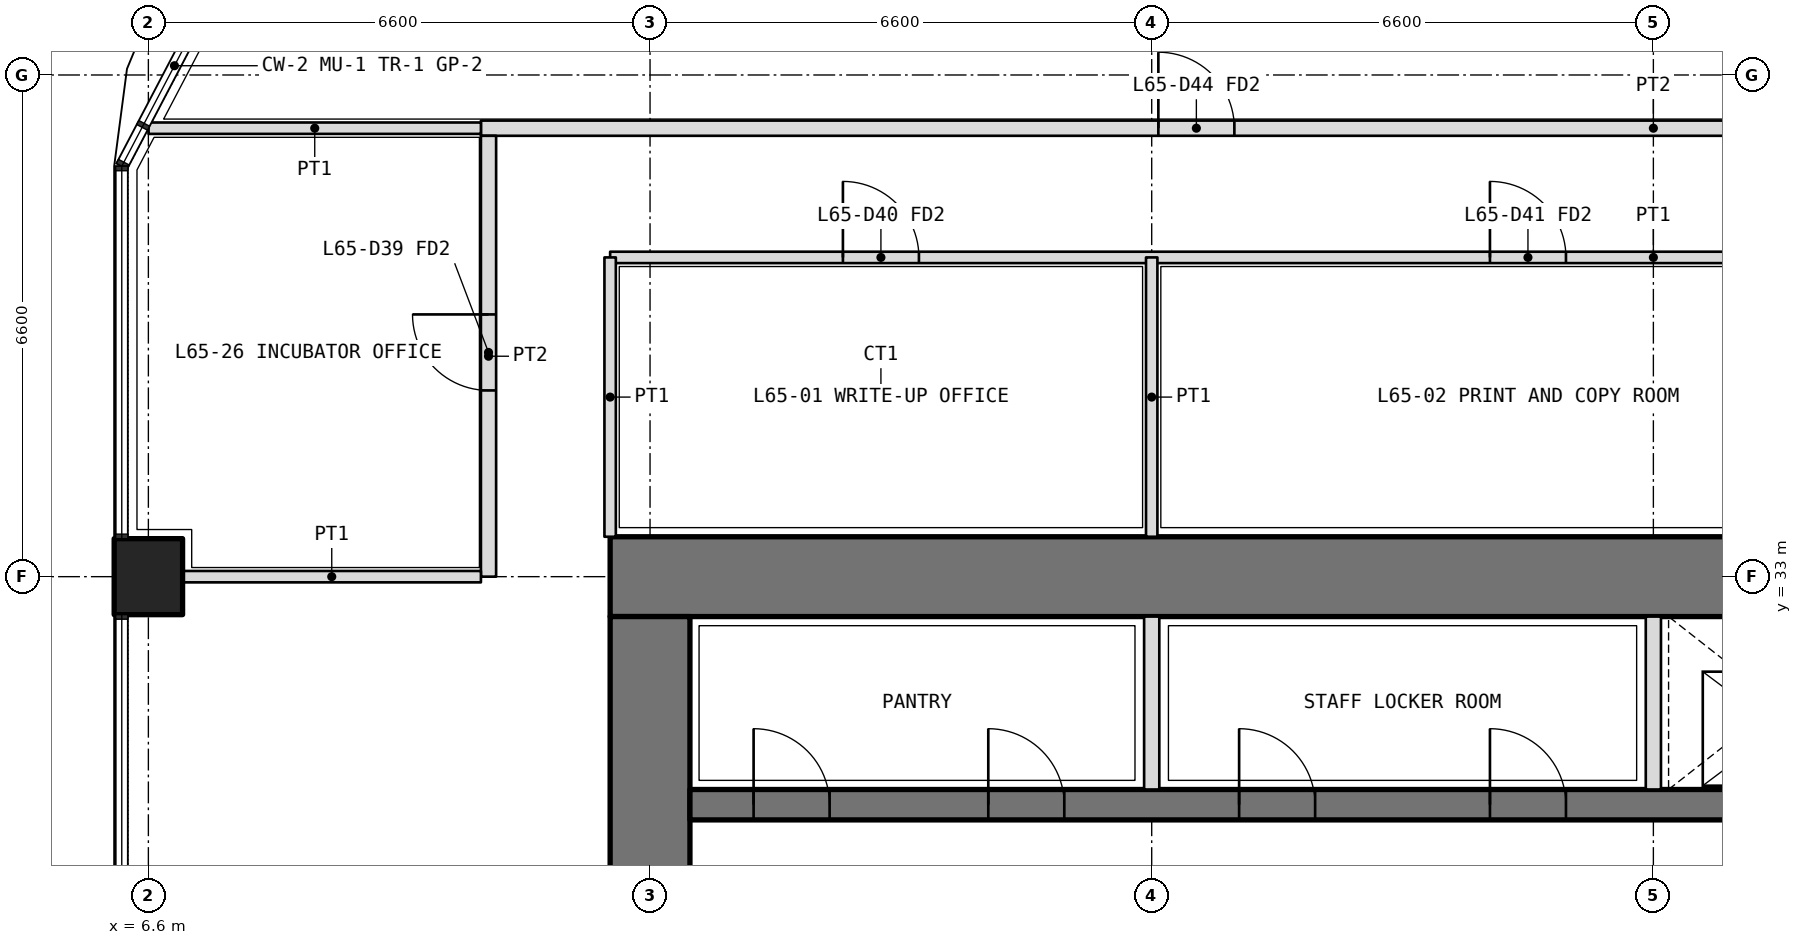
"""IFC4 building model, lengths in metres.
Left out: names, types, materials, properties, quantities, classifications, styles, units other than length and angle.
Written with IfcOpenShell. Run it as: python <this file> out.ifc"""

import sys

from ifc_helpers import new_model, si_unit, direction, frame, frame_2d, origin, origin_2d, place, context, subcontext, project, spatial, rectangle, extrude, element, fill, save


model = new_model("IFC4")
c1 = context("Model", 3, precision=1e-05, world=origin(), true_north=direction((0.0, 1.0)))
c2 = subcontext(c1, "Body", "Model", "MODEL_VIEW")
j1 = project(units=[si_unit("LENGTHUNIT", "METRE"), si_unit("PLANEANGLEUNIT", "RADIAN")], contexts=[c1])
p1 = place(None, origin())
s1 = spatial("IfcSite", under=j1, at=p1, CompositionType="ELEMENT")
p2 = place(p1, origin())
s2 = spatial("IfcBuilding", under=s1, at=p2, CompositionType="ELEMENT")
p3 = place(p2, frame((0.0, 0.0, 283.8)))
s3 = spatial("IfcBuildingStorey", under=s2, at=p3, CompositionType="ELEMENT", Elevation=283.8)
p4 = place(p3, frame((6.6, 33.0, 0.0), z_axis=(0.0, 0.0, 1.0), x_axis=(0.0, 1.0, 0.0)))
e1 = element("IfcColumn", 1, at=p4, inside=s3, PredefinedType="COLUMN", context=c2, shape_type="SweptSolid", body=[
    extrude(rectangle(XDim=1.0, YDim=0.9, at=origin_2d()), origin(), (0.0, 0.0, 1.0), 4.2),
])
p5 = place(p3, frame((40.125, 33.0, 0.0), z_axis=(0.0, 0.0, 1.0), x_axis=(-1.0, 0.0, 0.0)))
e2 = element("IfcWall", 2, at=p5, inside=s3, PredefinedType="SHEAR", context=c2, shape_type="SweptSolid", body=[
    extrude(rectangle(XDim=27.45, YDim=1.05, at=frame_2d((13.725, 0.0))), origin(), (0.0, 0.0, 1.0), 4.2),
])
p6 = place(p3, frame((13.2, 32.475, 0.0), z_axis=(0.0, 0.0, 1.0), x_axis=(0.0, -1.0, 0.0)))
e3 = element("IfcWall", 3, at=p6, inside=s3, PredefinedType="SHEAR", context=c2, shape_type="SweptSolid", body=[
    extrude(rectangle(XDim=18.75, YDim=1.05, at=frame_2d((9.375, 0.0))), origin(), (0.0, 0.0, 1.0), 4.2),
])
p7 = place(p6, frame((14.125, 0.0, 0.0)))
e4 = element("IfcOpeningElement", 4, at=p7, cuts=e3, PredefinedType="OPENING", context=c2, shape_type="SweptSolid", body=[
    extrude(rectangle(XDim=1.6, YDim=2.1, at=frame_2d((0.8, 1.05))), frame((0.0, 0.535, 0.0), z_axis=(0.0, -1.0, 0.0), x_axis=(1.0, 0.0, 0.0)), (0.0, 0.0, 1.0), 1.07),
])
p8 = place(p6, frame((3.325, 0.0, 0.0)))
e5 = element("IfcOpeningElement", 5, at=p8, cuts=e3, PredefinedType="OPENING", context=c2, shape_type="SweptSolid", body=[
    extrude(rectangle(XDim=1.6, YDim=2.1, at=frame_2d((0.8, 1.05))), frame((0.0, 0.535, 0.0), z_axis=(0.0, -1.0, 0.0), x_axis=(1.0, 0.0, 0.0)), (0.0, 0.0, 1.0), 1.07),
])
p9 = place(p3, frame((13.725, 30.0, 0.0), z_axis=(0.0, 0.0, 1.0), x_axis=(1.0, 0.0, 0.0)))
e6 = element("IfcWall", 6, at=p9, inside=s3, PredefinedType="SHEAR", context=c2, shape_type="SweptSolid", body=[
    extrude(rectangle(XDim=25.35, YDim=0.4, at=frame_2d((12.675, 0.0))), origin(), (0.0, 0.0, 1.0), 4.2),
])
p10 = place(p9, frame((0.837, 0.0, 0.0)))
e7 = element("IfcOpeningElement", 7, at=p10, cuts=e6, PredefinedType="OPENING", context=c2, shape_type="SweptSolid", body=[
    extrude(rectangle(XDim=1.0, YDim=2.1, at=frame_2d((0.5, 1.05))), frame((0.0, 0.21, 0.0), z_axis=(0.0, -1.0, 0.0), x_axis=(1.0, 0.0, 0.0)), (0.0, 0.0, 1.0), 0.42),
])
p11 = place(p9, frame((3.925, 0.0, 0.0)))
e8 = element("IfcOpeningElement", 8, at=p11, cuts=e6, PredefinedType="OPENING", context=c2, shape_type="SweptSolid", body=[
    extrude(rectangle(XDim=1.0, YDim=2.1, at=frame_2d((0.5, 1.05))), frame((0.0, 0.21, 0.0), z_axis=(0.0, -1.0, 0.0), x_axis=(1.0, 0.0, 0.0)), (0.0, 0.0, 1.0), 0.42),
])
p12 = place(p9, frame((7.225, 0.0, 0.0)))
e9 = element("IfcOpeningElement", 9, at=p12, cuts=e6, PredefinedType="OPENING", context=c2, shape_type="SweptSolid", body=[
    extrude(rectangle(XDim=1.0, YDim=2.1, at=frame_2d((0.5, 1.05))), frame((0.0, 0.21, 0.0), z_axis=(0.0, -1.0, 0.0), x_axis=(1.0, 0.0, 0.0)), (0.0, 0.0, 1.0), 0.42),
])
p13 = place(p9, frame((10.525, 0.0, 0.0)))
e10 = element("IfcOpeningElement", 10, at=p13, cuts=e6, PredefinedType="OPENING", context=c2, shape_type="SweptSolid", body=[
    extrude(rectangle(XDim=1.0, YDim=2.1, at=frame_2d((0.5, 1.05))), frame((0.0, 0.21, 0.0), z_axis=(0.0, -1.0, 0.0), x_axis=(1.0, 0.0, 0.0)), (0.0, 0.0, 1.0), 0.42),
])
p14 = place(p9, frame((13.775, 0.0, 0.0)))
e11 = element("IfcOpeningElement", 11, at=p14, cuts=e6, PredefinedType="OPENING", context=c2, shape_type="SweptSolid", body=[
    extrude(rectangle(XDim=1.1, YDim=2.1, at=frame_2d((0.55, 1.05))), frame((0.0, 0.21, 0.0), z_axis=(0.0, -1.0, 0.0), x_axis=(1.0, 0.0, 0.0)), (0.0, 0.0, 1.0), 0.42),
])
p15 = place(p9, frame((17.075, 0.0, 0.0)))
e12 = element("IfcOpeningElement", 12, at=p15, cuts=e6, PredefinedType="OPENING", context=c2, shape_type="SweptSolid", body=[
    extrude(rectangle(XDim=1.1, YDim=2.1, at=frame_2d((0.55, 1.05))), frame((0.0, 0.21, 0.0), z_axis=(0.0, -1.0, 0.0), x_axis=(1.0, 0.0, 0.0)), (0.0, 0.0, 1.0), 0.42),
])
p16 = place(p9, frame((20.375, 0.0, 0.0)))
e13 = element("IfcOpeningElement", 13, at=p16, cuts=e6, PredefinedType="OPENING", context=c2, shape_type="SweptSolid", body=[
    extrude(rectangle(XDim=1.1, YDim=2.1, at=frame_2d((0.55, 1.05))), frame((0.0, 0.21, 0.0), z_axis=(0.0, -1.0, 0.0), x_axis=(1.0, 0.0, 0.0)), (0.0, 0.0, 1.0), 0.42),
])
p17 = place(p9, frame((23.462, 0.0, 0.0)))
e14 = element("IfcOpeningElement", 14, at=p17, cuts=e6, PredefinedType="OPENING", context=c2, shape_type="SweptSolid", body=[
    extrude(rectangle(XDim=1.1, YDim=2.1, at=frame_2d((0.55, 1.05))), frame((0.0, 0.21, 0.0), z_axis=(0.0, -1.0, 0.0), x_axis=(1.0, 0.0, 0.0)), (0.0, 0.0, 1.0), 0.42),
])
for number, where, z_axis, x_axis in (
    (15, (19.8, 30.2, 0.0), (0.0, 0.0, 1.0), (0.0, 1.0, 0.0)),
    (16, (26.4, 30.2, 0.0), (0.0, 0.0, 1.0), (0.0, 1.0, 0.0)),
):
    element("IfcWall", number, at=place(p3, frame(where, z_axis=z_axis, x_axis=x_axis)), inside=s3, PredefinedType="PARTITIONING", context=c2, shape_type="SweptSolid", body=[
        extrude(rectangle(XDim=2.275, YDim=0.2, at=frame_2d((1.138, 0.0))), origin(), (0.0, 0.0, 1.0), 4.2),
    ])
p18 = place(p3, frame((12.675, 37.2, 0.0), z_axis=(0.0, 0.0, 1.0), x_axis=(1.0, 0.0, 0.0)))
e17 = element("IfcWall", 17, at=p18, inside=s3, PredefinedType="PARTITIONING", context=c2, shape_type="SweptSolid", body=[
    extrude(rectangle(XDim=27.45, YDim=0.15, at=frame_2d((13.725, 0.0))), origin(), (0.0, 0.0, 1.0), 3.0),
])
p19 = place(p18, frame((3.062, 0.0, 0.0)))
e18 = element("IfcOpeningElement", 18, at=p19, cuts=e17, PredefinedType="OPENING", context=c2, shape_type="SweptSolid", body=[
    extrude(rectangle(XDim=1.0, YDim=2.1, at=frame_2d((0.5, 1.05))), frame((0.0, 0.085, 0.0), z_axis=(0.0, -1.0, 0.0), x_axis=(1.0, 0.0, 0.0)), (0.0, 0.0, 1.0), 0.17),
])
p20 = place(p18, frame((11.575, 0.0, 0.0)))
e19 = element("IfcOpeningElement", 19, at=p20, cuts=e17, PredefinedType="OPENING", context=c2, shape_type="SweptSolid", body=[
    extrude(rectangle(XDim=1.0, YDim=2.1, at=frame_2d((0.5, 1.05))), frame((0.0, 0.085, 0.0), z_axis=(0.0, -1.0, 0.0), x_axis=(1.0, 0.0, 0.0)), (0.0, 0.0, 1.0), 0.17),
])
p21 = place(p18, frame((19.825, 0.0, 0.0)))
e20 = element("IfcOpeningElement", 20, at=p21, cuts=e17, PredefinedType="OPENING", context=c2, shape_type="SweptSolid", body=[
    extrude(rectangle(XDim=1.0, YDim=2.1, at=frame_2d((0.5, 1.05))), frame((0.0, 0.085, 0.0), z_axis=(0.0, -1.0, 0.0), x_axis=(1.0, 0.0, 0.0)), (0.0, 0.0, 1.0), 0.17),
])
p22 = place(p18, frame((25.038, 0.0, 0.0)))
e21 = element("IfcOpeningElement", 21, at=p22, cuts=e17, PredefinedType="OPENING", context=c2, shape_type="SweptSolid", body=[
    extrude(rectangle(XDim=1.0, YDim=2.1, at=frame_2d((0.5, 1.05))), frame((0.0, 0.085, 0.0), z_axis=(0.0, -1.0, 0.0), x_axis=(1.0, 0.0, 0.0)), (0.0, 0.0, 1.0), 0.17),
])
for number, where, z_axis, x_axis in (
    (22, (12.675, 33.525, 0.0), (0.0, 0.0, 1.0), (0.0, 1.0, 0.0)),
    (23, (19.8, 33.525, 0.0), (0.0, 0.0, 1.0), (0.0, 1.0, 0.0)),
):
    element("IfcWall", number, at=place(p3, frame(where, z_axis=z_axis, x_axis=x_axis)), inside=s3, PredefinedType="PARTITIONING", context=c2, shape_type="SweptSolid", body=[
        extrude(rectangle(XDim=3.675, YDim=0.15, at=frame_2d((1.837, 0.0))), origin(), (0.0, 0.0, 1.0), 3.0),
    ])
p23 = place(p3, frame((10.975, 38.9, 0.0), z_axis=(0.0, 0.0, 1.0), x_axis=(1.0, 0.0, 0.0)))
e24 = element("IfcWall", 24, at=p23, inside=s3, PredefinedType="PARTITIONING", context=c2, shape_type="SweptSolid", body=[
    extrude(rectangle(XDim=30.85, YDim=0.2, at=frame_2d((15.425, 0.0))), origin(), (0.0, 0.0, 1.0), 3.0),
])
p24 = place(p23, frame((8.913, 0.0, 0.0)))
e25 = element("IfcOpeningElement", 25, at=p24, cuts=e24, PredefinedType="OPENING", context=c2, shape_type="SweptSolid", body=[
    extrude(rectangle(XDim=1.0, YDim=2.1, at=frame_2d((0.5, 1.05))), frame((0.0, 0.11, 0.0), z_axis=(0.0, -1.0, 0.0), x_axis=(1.0, 0.0, 0.0)), (0.0, 0.0, 1.0), 0.22),
])
p25 = place(p23, frame((20.325, 0.0, 0.0)))
e26 = element("IfcOpeningElement", 26, at=p25, cuts=e24, PredefinedType="OPENING", context=c2, shape_type="SweptSolid", body=[
    extrude(rectangle(XDim=1.0, YDim=2.1, at=frame_2d((0.5, 1.05))), frame((0.0, 0.11, 0.0), z_axis=(0.0, -1.0, 0.0), x_axis=(1.0, 0.0, 0.0)), (0.0, 0.0, 1.0), 0.22),
])
p26 = place(p23, frame((23.625, 0.0, 0.0)))
e27 = element("IfcOpeningElement", 27, at=p26, cuts=e24, PredefinedType="OPENING", context=c2, shape_type="SweptSolid", body=[
    extrude(rectangle(XDim=1.0, YDim=2.1, at=frame_2d((0.5, 1.05))), frame((0.0, 0.11, 0.0), z_axis=(0.0, -1.0, 0.0), x_axis=(1.0, 0.0, 0.0)), (0.0, 0.0, 1.0), 0.22),
])
p27 = place(p23, frame((27.438, 0.0, 0.0)))
e28 = element("IfcOpeningElement", 28, at=p27, cuts=e24, PredefinedType="OPENING", context=c2, shape_type="SweptSolid", body=[
    extrude(rectangle(XDim=1.2, YDim=2.1, at=frame_2d((0.6, 1.05))), frame((0.0, 0.11, 0.0), z_axis=(0.0, -1.0, 0.0), x_axis=(1.0, 0.0, 0.0)), (0.0, 0.0, 1.0), 0.22),
])
p28 = place(p3, frame((11.075, 33.0, 0.0), z_axis=(0.0, 0.0, 1.0), x_axis=(0.0, 1.0, 0.0)))
e29 = element("IfcWall", 29, at=p28, inside=s3, PredefinedType="PARTITIONING", context=c2, shape_type="SweptSolid", body=[
    extrude(rectangle(XDim=5.8, YDim=0.2, at=frame_2d((2.9, 0.0))), origin(), (0.0, 0.0, 1.0), 3.0),
])
p29 = place(p28, frame((2.45, 0.0, 0.0)))
e30 = element("IfcOpeningElement", 30, at=p29, cuts=e29, PredefinedType="OPENING", context=c2, shape_type="SweptSolid", body=[
    extrude(rectangle(XDim=1.0, YDim=2.1, at=frame_2d((0.5, 1.05))), frame((0.0, 0.11, 0.0), z_axis=(0.0, -1.0, 0.0), x_axis=(1.0, 0.0, 0.0)), (0.0, 0.0, 1.0), 0.22),
])
p30 = place(p3, frame((6.603, 38.9, 0.0), z_axis=(0.0, 0.0, 1.0), x_axis=(1.0, 0.0, 0.0)))
e31 = element("IfcWall", 31, at=p30, inside=s3, PredefinedType="PARTITIONING", context=c2, shape_type="SweptSolid", body=[
    extrude(rectangle(XDim=4.373, YDim=0.15, at=frame_2d((2.186, 0.0))), origin(), (0.0, 0.0, 1.0), 2.7),
])
p31 = place(p3, frame((7.05, 33.0, 0.0), z_axis=(0.0, 0.0, 1.0), x_axis=(1.0, 0.0, 0.0)))
e32 = element("IfcWall", 32, at=p31, inside=s3, PredefinedType="PARTITIONING", context=c2, shape_type="SweptSolid", body=[
    extrude(rectangle(XDim=3.925, YDim=0.15, at=frame_2d((1.962, 0.0))), origin(), (0.0, 0.0, 1.0), 3.0),
])
p32 = place(p19, origin())
e33 = element("IfcDoor", 33, at=p32, inside=s3, OperationType="SINGLE_SWING_LEFT", PredefinedType="DOOR", context=c2, shape_type="SweptSolid", body=[
    extrude(rectangle(XDim=1.0, YDim=2.1, at=frame_2d((0.5, 1.05))), frame((0.0, 0.025, 0.0), z_axis=(0.0, -1.0, 0.0), x_axis=(1.0, 0.0, 0.0)), (0.0, 0.0, 1.0), 0.05),
])
fill(e18, e33)
p33 = place(p20, origin())
e34 = element("IfcDoor", 34, at=p33, inside=s3, OperationType="SINGLE_SWING_LEFT", PredefinedType="DOOR", context=c2, shape_type="SweptSolid", body=[
    extrude(rectangle(XDim=1.0, YDim=2.1, at=frame_2d((0.5, 1.05))), frame((0.0, 0.025, 0.0), z_axis=(0.0, -1.0, 0.0), x_axis=(1.0, 0.0, 0.0)), (0.0, 0.0, 1.0), 0.05),
])
fill(e19, e34)
p34 = place(p24, origin())
e35 = element("IfcDoor", 35, at=p34, inside=s3, OperationType="SINGLE_SWING_LEFT", PredefinedType="DOOR", context=c2, shape_type="SweptSolid", body=[
    extrude(rectangle(XDim=1.0, YDim=2.1, at=frame_2d((0.5, 1.05))), frame((0.0, 0.025, 0.0), z_axis=(0.0, -1.0, 0.0), x_axis=(1.0, 0.0, 0.0)), (0.0, 0.0, 1.0), 0.05),
])
fill(e25, e35)
p35 = place(p29, origin())
e36 = element("IfcDoor", 36, at=p35, inside=s3, OperationType="SINGLE_SWING_RIGHT", PredefinedType="DOOR", context=c2, shape_type="SweptSolid", body=[
    extrude(rectangle(XDim=1.0, YDim=2.1, at=frame_2d((0.5, 1.05))), frame((0.0, 0.025, 0.0), z_axis=(0.0, -1.0, 0.0), x_axis=(1.0, 0.0, 0.0)), (0.0, 0.0, 1.0), 0.05),
])
fill(e30, e36)
p36 = place(p10, origin())
e37 = element("IfcDoor", 37, at=p36, inside=s3, OperationType="SINGLE_SWING_LEFT", PredefinedType="DOOR", context=c2, shape_type="SweptSolid", body=[
    extrude(rectangle(XDim=1.0, YDim=2.1, at=frame_2d((0.5, 1.05))), frame((0.0, 0.025, 0.0), z_axis=(0.0, -1.0, 0.0), x_axis=(1.0, 0.0, 0.0)), (0.0, 0.0, 1.0), 0.05),
])
fill(e7, e37)
p37 = place(p11, origin())
e38 = element("IfcDoor", 38, at=p37, inside=s3, OperationType="SINGLE_SWING_LEFT", PredefinedType="DOOR", context=c2, shape_type="SweptSolid", body=[
    extrude(rectangle(XDim=1.0, YDim=2.1, at=frame_2d((0.5, 1.05))), frame((0.0, 0.025, 0.0), z_axis=(0.0, -1.0, 0.0), x_axis=(1.0, 0.0, 0.0)), (0.0, 0.0, 1.0), 0.05),
])
fill(e8, e38)
p38 = place(p12, origin())
e39 = element("IfcDoor", 39, at=p38, inside=s3, OperationType="SINGLE_SWING_LEFT", PredefinedType="DOOR", context=c2, shape_type="SweptSolid", body=[
    extrude(rectangle(XDim=1.0, YDim=2.1, at=frame_2d((0.5, 1.05))), frame((0.0, 0.025, 0.0), z_axis=(0.0, -1.0, 0.0), x_axis=(1.0, 0.0, 0.0)), (0.0, 0.0, 1.0), 0.05),
])
fill(e9, e39)
p39 = place(p13, origin())
e40 = element("IfcDoor", 40, at=p39, inside=s3, OperationType="SINGLE_SWING_LEFT", PredefinedType="DOOR", context=c2, shape_type="SweptSolid", body=[
    extrude(rectangle(XDim=1.0, YDim=2.1, at=frame_2d((0.5, 1.05))), frame((0.0, 0.025, 0.0), z_axis=(0.0, -1.0, 0.0), x_axis=(1.0, 0.0, 0.0)), (0.0, 0.0, 1.0), 0.05),
])
fill(e10, e40)
save(model, sys.argv[1])
